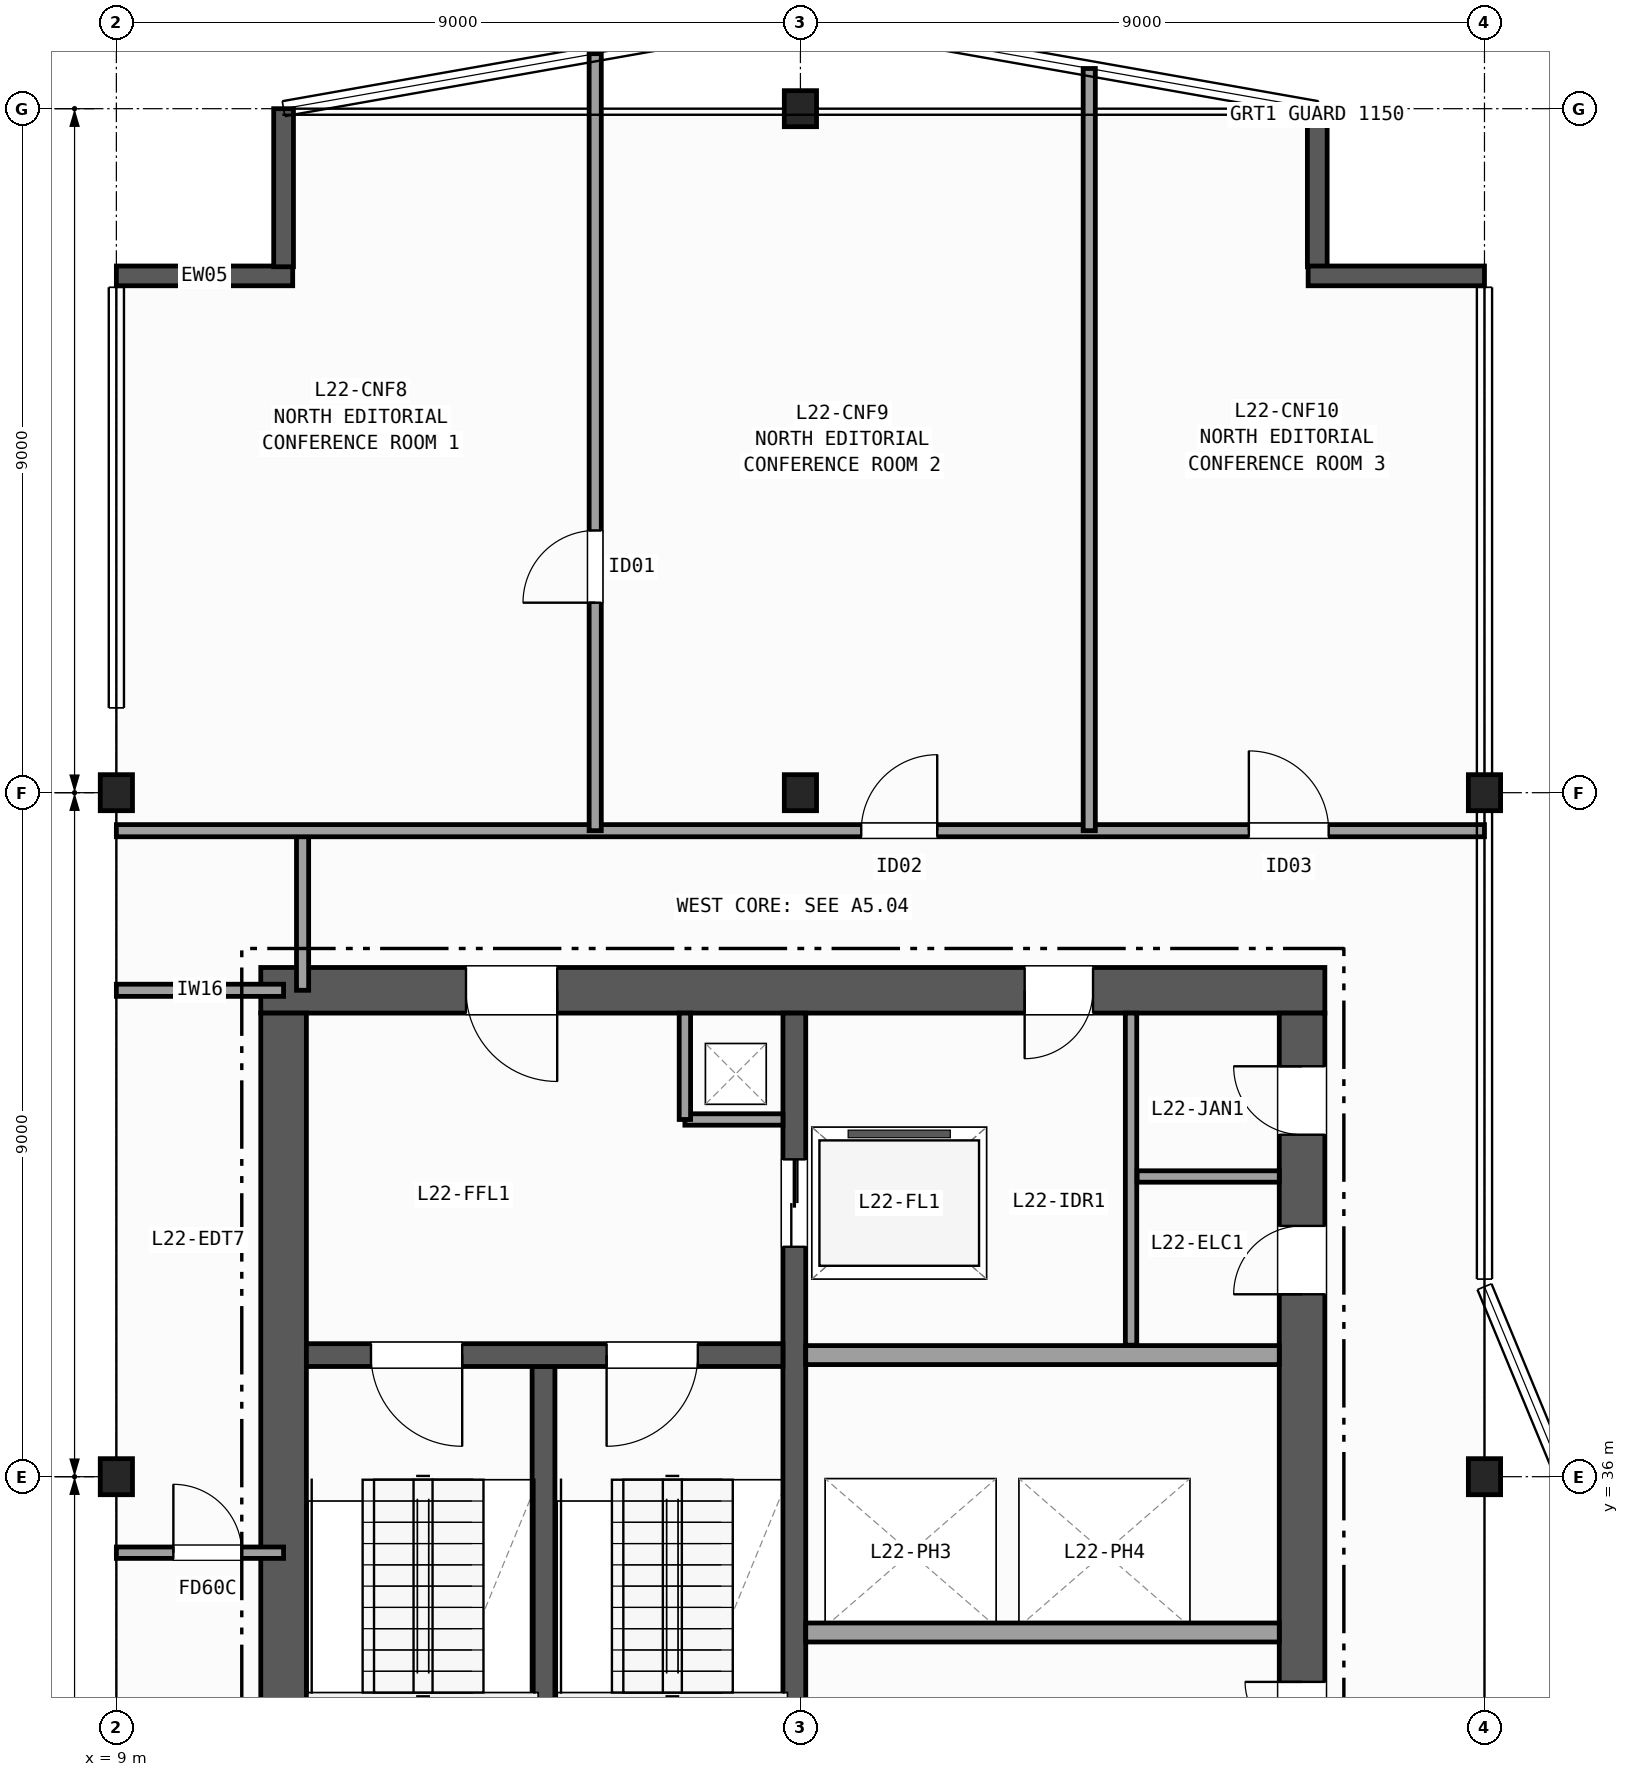
"""IFC4 building model, lengths in metres.
Left out: names, types, materials, properties, quantities, classifications, styles, units other than length and angle.
Written with IfcOpenShell. Run it as: python <this file> out.ifc"""

import sys

from ifc_helpers import new_model, si_unit, direction, frame, frame_2d, origin, origin_2d, place, context, subcontext, project, spatial, rectangle, i_section, extrude, element, fill, save


model = new_model("IFC4")
c1 = context("Model", 3, precision=1e-05, world=origin(), true_north=direction((0.0, 1.0)))
c2 = subcontext(c1, "Body", "Model", "MODEL_VIEW")
j1 = project(units=[si_unit("LENGTHUNIT", "METRE"), si_unit("PLANEANGLEUNIT", "RADIAN")], contexts=[c1])
p1 = place(None, origin())
s1 = spatial("IfcSite", under=j1, at=p1, CompositionType="ELEMENT")
p2 = place(p1, origin())
s2 = spatial("IfcBuilding", under=s1, at=p2, CompositionType="ELEMENT")
p3 = place(p2, frame((0.0, 0.0, 92.8)))
s3 = spatial("IfcBuildingStorey", under=s2, at=p3, CompositionType="ELEMENT", Elevation=92.8)
for number, where, z_axis, x_axis in (
    (1, (9.0, 36.0, 0.0), (0.0, 0.0, 1.0), (1.0, 0.0, 0.0)),
    (2, (9.0, 45.0, 0.0), (0.0, 0.0, 1.0), (1.0, 0.0, 0.0)),
    (3, (18.0, 45.0, 0.0), (0.0, 0.0, 1.0), (1.0, 0.0, 0.0)),
    (4, (18.0, 54.0, 0.0), (0.0, 0.0, 1.0), (1.0, 0.0, 0.0)),
    (5, (27.0, 36.0, 0.0), (0.0, 0.0, 1.0), (1.0, 0.0, 0.0)),
    (6, (27.0, 45.0, 0.0), (0.0, 0.0, 1.0), (1.0, 0.0, 0.0)),
):
    element("IfcColumn", number, at=place(p3, frame(where, z_axis=z_axis, x_axis=x_axis)), inside=s3, PredefinedType="COLUMN", context=c2, shape_type="SweptSolid", body=[
        extrude(i_section(OverallWidth=0.424, OverallDepth=0.474, WebThickness=0.048, FlangeThickness=0.077, FilletRadius=0.015, at=origin_2d()), origin(), (0.0, 0.0, 1.0), 3.7),
    ])
p4 = place(p3, frame((9.0, 51.8, 0.0), z_axis=(0.0, 0.0, 1.0), x_axis=(1.0, 0.0, 0.0)))
e7 = element("IfcWall", 7, at=p4, inside=s3, PredefinedType="SOLIDWALL", context=c2, shape_type="SweptSolid", body=[
    extrude(rectangle(XDim=2.32, YDim=0.26, at=frame_2d((1.16, 0.0))), origin(), (0.0, 0.0, 1.0), 3.42),
])
for number, where, z_axis, x_axis in (
    (8, (11.2, 51.92, 0.0), (0.0, 0.0, 1.0), (0.0, 1.0, 0.0)),
    (9, (24.8, 54.0, 0.0), (0.0, 0.0, 1.0), (0.0, -1.0, 0.0)),
):
    element("IfcWall", number, at=place(p3, frame(where, z_axis=z_axis, x_axis=x_axis)), inside=s3, PredefinedType="SOLIDWALL", context=c2, shape_type="SweptSolid", body=[
        extrude(rectangle(XDim=2.08, YDim=0.26, at=frame_2d((1.04, 0.0))), origin(), (0.0, 0.0, 1.0), 3.42),
    ])
p5 = place(p3, frame((24.68, 51.8, 0.0), z_axis=(0.0, 0.0, 1.0), x_axis=(1.0, 0.0, 0.0)))
e10 = element("IfcWall", 10, at=p5, inside=s3, PredefinedType="SOLIDWALL", context=c2, shape_type="SweptSolid", body=[
    extrude(rectangle(XDim=2.32, YDim=0.26, at=frame_2d((1.16, 0.0))), origin(), (0.0, 0.0, 1.0), 3.42),
])
p6 = place(p3, frame((24.9, 42.4, 0.0), z_axis=(0.0, 0.0, 1.0), x_axis=(-1.0, 0.0, 0.0)))
e11 = element("IfcWall", 11, at=p6, inside=s3, PredefinedType="SHEAR", context=c2, shape_type="SweptSolid", body=[
    extrude(rectangle(XDim=14.0, YDim=0.6, at=frame_2d((7.0, 0.0))), origin(), (0.0, 0.0, 1.0), 3.42),
])
p7 = place(p6, frame((10.1, 0.0, 0.0)))
e12 = element("IfcOpeningElement", 12, at=p7, cuts=e11, PredefinedType="OPENING", context=c2, shape_type="SweptSolid", body=[
    extrude(rectangle(XDim=1.2, YDim=2.15, at=frame_2d((0.6, 1.075))), frame((0.0, 0.31, 0.0), z_axis=(0.0, -1.0, 0.0), x_axis=(1.0, 0.0, 0.0)), (0.0, 0.0, 1.0), 0.62),
])
p8 = place(p6, frame((3.05, 0.0, 0.0)))
e13 = element("IfcOpeningElement", 13, at=p8, cuts=e11, PredefinedType="OPENING", context=c2, shape_type="SweptSolid", body=[
    extrude(rectangle(XDim=0.9, YDim=2.1, at=frame_2d((0.45, 1.05))), frame((0.0, 0.31, 0.0), z_axis=(0.0, -1.0, 0.0), x_axis=(1.0, 0.0, 0.0)), (0.0, 0.0, 1.0), 0.62),
])
p9 = place(p3, frame((11.2, 42.1, 0.0), z_axis=(0.0, 0.0, 1.0), x_axis=(0.0, -1.0, 0.0)))
e14 = element("IfcWall", 14, at=p9, inside=s3, PredefinedType="SHEAR", context=c2, shape_type="SweptSolid", body=[
    extrude(rectangle(XDim=13.6, YDim=0.6, at=frame_2d((6.8, 0.0))), origin(), (0.0, 0.0, 1.0), 3.42),
])
p10 = place(p3, frame((24.6, 28.5, 0.0), z_axis=(0.0, 0.0, 1.0), x_axis=(0.0, 1.0, 0.0)))
e15 = element("IfcWall", 15, at=p10, inside=s3, PredefinedType="SHEAR", context=c2, shape_type="SweptSolid", body=[
    extrude(rectangle(XDim=13.6, YDim=0.6, at=frame_2d((6.8, 0.0))), origin(), (0.0, 0.0, 1.0), 3.42),
])
p11 = place(p10, frame((3.3, 0.0, 0.0)))
e16 = element("IfcOpeningElement", 16, at=p11, cuts=e15, PredefinedType="OPENING", context=c2, shape_type="SweptSolid", body=[
    extrude(rectangle(XDim=1.5, YDim=2.2, at=frame_2d((0.75, 1.1))), frame((0.0, 0.31, 0.0), z_axis=(0.0, -1.0, 0.0), x_axis=(1.0, 0.0, 0.0)), (0.0, 0.0, 1.0), 0.62),
])
p12 = place(p10, frame((9.9, 0.0, 0.0)))
e17 = element("IfcOpeningElement", 17, at=p12, cuts=e15, PredefinedType="OPENING", context=c2, shape_type="SweptSolid", body=[
    extrude(rectangle(XDim=0.9, YDim=2.1, at=frame_2d((0.45, 1.05))), frame((0.0, 0.31, 0.0), z_axis=(0.0, -1.0, 0.0), x_axis=(1.0, 0.0, 0.0)), (0.0, 0.0, 1.0), 0.62),
])
p13 = place(p10, frame((12.0, 0.0, 0.0)))
e18 = element("IfcOpeningElement", 18, at=p13, cuts=e15, PredefinedType="OPENING", context=c2, shape_type="SweptSolid", body=[
    extrude(rectangle(XDim=0.9, YDim=2.1, at=frame_2d((0.45, 1.05))), frame((0.0, 0.31, 0.0), z_axis=(0.0, -1.0, 0.0), x_axis=(1.0, 0.0, 0.0)), (0.0, 0.0, 1.0), 0.62),
])
p14 = place(p3, frame((14.62, 28.5, 0.0), z_axis=(0.0, 0.0, 1.0), x_axis=(0.0, 1.0, 0.0)))
e19 = element("IfcWall", 19, at=p14, inside=s3, PredefinedType="SHEAR", context=c2, shape_type="SweptSolid", body=[
    extrude(rectangle(XDim=8.95, YDim=0.3, at=frame_2d((4.475, 0.0))), origin(), (0.0, 0.0, 1.0), 3.42),
])
p15 = place(p3, frame((17.92, 42.1, 0.0), z_axis=(0.0, 0.0, 1.0), x_axis=(0.0, -1.0, 0.0)))
e20 = element("IfcWall", 20, at=p15, inside=s3, PredefinedType="SHEAR", context=c2, shape_type="SweptSolid", body=[
    extrude(rectangle(XDim=13.6, YDim=0.3, at=frame_2d((6.8, 0.0))), origin(), (0.0, 0.0, 1.0), 3.42),
])
p16 = place(p15, frame((1.925, 0.0, 0.0)))
e21 = element("IfcOpeningElement", 21, at=p16, cuts=e20, PredefinedType="OPENING", context=c2, shape_type="SweptSolid", body=[
    extrude(rectangle(XDim=1.15, YDim=2.15, at=frame_2d((0.575, 1.075))), frame((0.0, 0.16, 0.0), z_axis=(0.0, -1.0, 0.0), x_axis=(1.0, 0.0, 0.0)), (0.0, 0.0, 1.0), 0.32),
])
p17 = place(p3, frame((17.77, 37.6, 0.0), z_axis=(0.0, 0.0, 1.0), x_axis=(-1.0, 0.0, 0.0)))
e22 = element("IfcWall", 22, at=p17, inside=s3, PredefinedType="SHEAR", context=c2, shape_type="SweptSolid", body=[
    extrude(rectangle(XDim=6.27, YDim=0.3, at=frame_2d((3.135, 0.0))), origin(), (0.0, 0.0, 1.0), 3.42),
])
p18 = place(p17, frame((4.22, 0.0, 0.0)))
e23 = element("IfcOpeningElement", 23, at=p18, cuts=e22, PredefinedType="OPENING", context=c2, shape_type="SweptSolid", body=[
    extrude(rectangle(XDim=1.2, YDim=2.15, at=frame_2d((0.6, 1.075))), frame((0.0, 0.16, 0.0), z_axis=(0.0, -1.0, 0.0), x_axis=(1.0, 0.0, 0.0)), (0.0, 0.0, 1.0), 0.32),
])
p19 = place(p17, frame((1.12, 0.0, 0.0)))
e24 = element("IfcOpeningElement", 24, at=p19, cuts=e22, PredefinedType="OPENING", context=c2, shape_type="SweptSolid", body=[
    extrude(rectangle(XDim=1.2, YDim=2.15, at=frame_2d((0.6, 1.075))), frame((0.0, 0.16, 0.0), z_axis=(0.0, -1.0, 0.0), x_axis=(1.0, 0.0, 0.0)), (0.0, 0.0, 1.0), 0.32),
])
p20 = place(p3, frame((16.48, 40.7, 0.0), z_axis=(0.0, 0.0, 1.0), x_axis=(1.0, 0.0, 0.0)))
e25 = element("IfcWall", 25, at=p20, inside=s3, PredefinedType="PARTITIONING", context=c2, shape_type="SweptSolid", body=[
    extrude(rectangle(XDim=1.29, YDim=0.15, at=frame_2d((0.645, 0.0))), origin(), (0.0, 0.0, 1.0), 3.42),
])
p21 = place(p3, frame((16.48, 40.7, 0.0), z_axis=(0.0, 0.0, 1.0), x_axis=(0.0, 1.0, 0.0)))
e26 = element("IfcWall", 26, at=p21, inside=s3, PredefinedType="PARTITIONING", context=c2, shape_type="SweptSolid", body=[
    extrude(rectangle(XDim=1.4, YDim=0.15, at=frame_2d((0.7, 0.0))), origin(), (0.0, 0.0, 1.0), 3.42),
])
for number, where, z_axis, x_axis in (
    (27, (18.07, 37.6, 0.0), (0.0, 0.0, 1.0), (1.0, 0.0, 0.0)),
    (28, (24.3, 33.95, 0.0), (0.0, 0.0, 1.0), (-1.0, 0.0, 0.0)),
):
    element("IfcWall", number, at=place(p3, frame(where, z_axis=z_axis, x_axis=x_axis)), inside=s3, PredefinedType="PARTITIONING", context=c2, shape_type="SweptSolid", body=[
        extrude(rectangle(XDim=6.23, YDim=0.25, at=frame_2d((3.115, 0.0))), origin(), (0.0, 0.0, 1.0), 3.42),
    ])
p22 = place(p3, frame((22.35, 37.73, 0.0), z_axis=(0.0, 0.0, 1.0), x_axis=(0.0, 1.0, 0.0)))
e29 = element("IfcWall", 29, at=p22, inside=s3, PredefinedType="PARTITIONING", context=c2, shape_type="SweptSolid", body=[
    extrude(rectangle(XDim=4.37, YDim=0.15, at=frame_2d((2.185, 0.0))), origin(), (0.0, 0.0, 1.0), 3.42),
])
p23 = place(p3, frame((22.43, 39.95, 0.0), z_axis=(0.0, 0.0, 1.0), x_axis=(1.0, 0.0, 0.0)))
e30 = element("IfcWall", 30, at=p23, inside=s3, PredefinedType="PARTITIONING", context=c2, shape_type="SweptSolid", body=[
    extrude(rectangle(XDim=1.87, YDim=0.15, at=frame_2d((0.935, 0.0))), origin(), (0.0, 0.0, 1.0), 3.42),
])
p24 = place(p3, frame((9.0, 42.4, 0.0), z_axis=(0.0, 0.0, 1.0), x_axis=(1.0, 0.0, 0.0)))
e31 = element("IfcWall", 31, at=p24, inside=s3, PredefinedType="PARTITIONING", context=c2, shape_type="SweptSolid", body=[
    extrude(rectangle(XDim=2.2, YDim=0.16, at=frame_2d((1.1, 0.0))), origin(), (0.0, 0.0, 1.0), 2.627),
])
p25 = place(p3, frame((11.45, 42.4, 0.0), z_axis=(0.0, 0.0, 1.0), x_axis=(0.0, 1.0, 0.0)))
e32 = element("IfcWall", 32, at=p25, inside=s3, PredefinedType="PARTITIONING", context=c2, shape_type="SweptSolid", body=[
    extrude(rectangle(XDim=2.1, YDim=0.16, at=frame_2d((1.05, 0.0))), origin(), (0.0, 0.0, 1.0), 3.42),
])
p26 = place(p3, frame((9.0, 35.0, 0.0), z_axis=(0.0, 0.0, 1.0), x_axis=(1.0, 0.0, 0.0)))
e33 = element("IfcWall", 33, at=p26, inside=s3, PredefinedType="PARTITIONING", context=c2, shape_type="SweptSolid", body=[
    extrude(rectangle(XDim=2.2, YDim=0.15, at=frame_2d((1.1, 0.0))), origin(), (0.0, 0.0, 1.0), 2.627),
])
p27 = place(p26, frame((0.75, 0.0, 0.0)))
e34 = element("IfcOpeningElement", 34, at=p27, cuts=e33, PredefinedType="OPENING", context=c2, shape_type="SweptSolid", body=[
    extrude(rectangle(XDim=0.9, YDim=2.1, at=frame_2d((0.45, 1.05))), frame((0.0, 0.085, 0.0), z_axis=(0.0, -1.0, 0.0), x_axis=(1.0, 0.0, 0.0)), (0.0, 0.0, 1.0), 0.17),
])
p28 = place(p3, frame((9.0, 44.5, 0.0), z_axis=(0.0, 0.0, 1.0), x_axis=(1.0, 0.0, 0.0)))
e35 = element("IfcWall", 35, at=p28, inside=s3, PredefinedType="PARTITIONING", context=c2, shape_type="SweptSolid", body=[
    extrude(rectangle(XDim=18.0, YDim=0.16, at=frame_2d((9.0, 0.0))), origin(), (0.0, 0.0, 1.0), 2.627),
])
p29 = place(p28, frame((9.8, 0.0, 0.0)))
e36 = element("IfcOpeningElement", 36, at=p29, cuts=e35, PredefinedType="OPENING", context=c2, shape_type="SweptSolid", body=[
    extrude(rectangle(XDim=1.0, YDim=2.1, at=frame_2d((0.5, 1.05))), frame((0.0, 0.09, 0.0), z_axis=(0.0, -1.0, 0.0), x_axis=(1.0, 0.0, 0.0)), (0.0, 0.0, 1.0), 0.18),
])
p30 = place(p28, frame((14.9, 0.0, 0.0)))
e37 = element("IfcOpeningElement", 37, at=p30, cuts=e35, PredefinedType="OPENING", context=c2, shape_type="SweptSolid", body=[
    extrude(rectangle(XDim=1.05, YDim=2.15, at=frame_2d((0.525, 1.075))), frame((0.0, 0.09, 0.0), z_axis=(0.0, -1.0, 0.0), x_axis=(1.0, 0.0, 0.0)), (0.0, 0.0, 1.0), 0.18),
])
p31 = place(p3, frame((15.3, 44.5, 0.0), z_axis=(0.0, 0.0, 1.0), x_axis=(0.0, 1.0, 0.0)))
e38 = element("IfcWall", 38, at=p31, inside=s3, PredefinedType="PARTITIONING", context=c2, shape_type="SweptSolid", body=[
    extrude(rectangle(XDim=10.224, YDim=0.16, at=frame_2d((5.112, 0.0))), origin(), (0.0, 0.0, 1.0), 3.42),
])
p32 = place(p31, frame((3.0, 0.0, 0.0)))
e39 = element("IfcOpeningElement", 39, at=p32, cuts=e38, PredefinedType="OPENING", context=c2, shape_type="SweptSolid", body=[
    extrude(rectangle(XDim=0.95, YDim=2.1, at=frame_2d((0.475, 1.05))), frame((0.0, 0.09, 0.0), z_axis=(0.0, -1.0, 0.0), x_axis=(1.0, 0.0, 0.0)), (0.0, 0.0, 1.0), 0.18),
])
p33 = place(p3, frame((21.8, 44.5, 0.0), z_axis=(0.0, 0.0, 1.0), x_axis=(0.0, 1.0, 0.0)))
e40 = element("IfcWall", 40, at=p33, inside=s3, PredefinedType="PARTITIONING", context=c2, shape_type="SweptSolid", body=[
    extrude(rectangle(XDim=10.029, YDim=0.16, at=frame_2d((5.015, 0.0))), origin(), (0.0, 0.0, 1.0), 3.42),
])
p34 = place(p18, origin())
e41 = element("IfcDoor", 41, at=p34, inside=s3, OperationType="SINGLE_SWING_LEFT", PredefinedType="DOOR", context=c2, shape_type="SweptSolid", body=[
    extrude(rectangle(XDim=1.2, YDim=2.15, at=frame_2d((0.6, 1.075))), frame((0.0, 0.025, 0.0), z_axis=(0.0, -1.0, 0.0), x_axis=(1.0, 0.0, 0.0)), (0.0, 0.0, 1.0), 0.05),
])
fill(e23, e41)
p35 = place(p19, origin())
e42 = element("IfcDoor", 42, at=p35, inside=s3, OperationType="SINGLE_SWING_RIGHT", PredefinedType="DOOR", context=c2, shape_type="SweptSolid", body=[
    extrude(rectangle(XDim=1.2, YDim=2.15, at=frame_2d((0.6, 1.075))), frame((0.0, 0.025, 0.0), z_axis=(0.0, -1.0, 0.0), x_axis=(1.0, 0.0, 0.0)), (0.0, 0.0, 1.0), 0.05),
])
fill(e24, e42)
p36 = place(p11, origin())
e43 = element("IfcDoor", 43, at=p36, inside=s3, OperationType="DOUBLE_DOOR_SINGLE_SWING", PredefinedType="DOOR", context=c2, shape_type="SweptSolid", body=[
    extrude(rectangle(XDim=1.5, YDim=2.2, at=frame_2d((0.75, 1.1))), frame((0.0, 0.025, 0.0), z_axis=(0.0, -1.0, 0.0), x_axis=(1.0, 0.0, 0.0)), (0.0, 0.0, 1.0), 0.05),
])
fill(e16, e43)
p37 = place(p7, origin())
e44 = element("IfcDoor", 44, at=p37, inside=s3, OperationType="SINGLE_SWING_LEFT", PredefinedType="DOOR", context=c2, shape_type="SweptSolid", body=[
    extrude(rectangle(XDim=1.2, YDim=2.15, at=frame_2d((0.6, 1.075))), frame((0.0, 0.025, 0.0), z_axis=(0.0, -1.0, 0.0), x_axis=(1.0, 0.0, 0.0)), (0.0, 0.0, 1.0), 0.05),
])
fill(e12, e44)
p38 = place(p12, origin())
e45 = element("IfcDoor", 45, at=p38, inside=s3, OperationType="SINGLE_SWING_LEFT", PredefinedType="DOOR", context=c2, shape_type="SweptSolid", body=[
    extrude(rectangle(XDim=0.9, YDim=2.1, at=frame_2d((0.45, 1.05))), frame((0.0, 0.025, 0.0), z_axis=(0.0, -1.0, 0.0), x_axis=(1.0, 0.0, 0.0)), (0.0, 0.0, 1.0), 0.05),
])
fill(e17, e45)
p39 = place(p8, origin())
e46 = element("IfcDoor", 46, at=p39, inside=s3, OperationType="SINGLE_SWING_RIGHT", PredefinedType="DOOR", context=c2, shape_type="SweptSolid", body=[
    extrude(rectangle(XDim=0.9, YDim=2.1, at=frame_2d((0.45, 1.05))), frame((0.0, 0.025, 0.0), z_axis=(0.0, -1.0, 0.0), x_axis=(1.0, 0.0, 0.0)), (0.0, 0.0, 1.0), 0.05),
])
fill(e13, e46)
p40 = place(p13, origin())
e47 = element("IfcDoor", 47, at=p40, inside=s3, OperationType="SINGLE_SWING_RIGHT", PredefinedType="DOOR", context=c2, shape_type="SweptSolid", body=[
    extrude(rectangle(XDim=0.9, YDim=2.1, at=frame_2d((0.45, 1.05))), frame((0.0, 0.025, 0.0), z_axis=(0.0, -1.0, 0.0), x_axis=(1.0, 0.0, 0.0)), (0.0, 0.0, 1.0), 0.05),
])
fill(e18, e47)
p41 = place(p16, origin())
e48 = element("IfcDoor", 48, at=p41, inside=s3, OperationType="DOUBLE_DOOR_SLIDING", PredefinedType="DOOR", context=c2, shape_type="SweptSolid", body=[
    extrude(rectangle(XDim=1.15, YDim=2.15, at=frame_2d((0.575, 1.075))), frame((0.0, 0.025, 0.0), z_axis=(0.0, -1.0, 0.0), x_axis=(1.0, 0.0, 0.0)), (0.0, 0.0, 1.0), 0.05),
])
fill(e21, e48)
p42 = place(p27, origin())
e49 = element("IfcDoor", 49, at=p42, inside=s3, OperationType="SINGLE_SWING_LEFT", PredefinedType="DOOR", context=c2, shape_type="SweptSolid", body=[
    extrude(rectangle(XDim=0.9, YDim=2.1, at=frame_2d((0.45, 1.05))), frame((0.0, 0.025, 0.0), z_axis=(0.0, -1.0, 0.0), x_axis=(1.0, 0.0, 0.0)), (0.0, 0.0, 1.0), 0.05),
])
fill(e34, e49)
p43 = place(p32, origin())
e50 = element("IfcDoor", 50, at=p43, inside=s3, OperationType="SINGLE_SWING_LEFT", PredefinedType="DOOR", context=c2, shape_type="SweptSolid", body=[
    extrude(rectangle(XDim=0.95, YDim=2.1, at=frame_2d((0.475, 1.05))), frame((0.0, 0.025, 0.0), z_axis=(0.0, -1.0, 0.0), x_axis=(1.0, 0.0, 0.0)), (0.0, 0.0, 1.0), 0.05),
])
fill(e39, e50)
p44 = place(p29, origin())
e51 = element("IfcDoor", 51, at=p44, inside=s3, OperationType="SINGLE_SWING_RIGHT", PredefinedType="DOOR", context=c2, shape_type="SweptSolid", body=[
    extrude(rectangle(XDim=1.0, YDim=2.1, at=frame_2d((0.5, 1.05))), frame((0.0, 0.025, 0.0), z_axis=(0.0, -1.0, 0.0), x_axis=(1.0, 0.0, 0.0)), (0.0, 0.0, 1.0), 0.05),
])
fill(e36, e51)
p45 = place(p30, origin())
e52 = element("IfcDoor", 52, at=p45, inside=s3, OperationType="SINGLE_SWING_LEFT", PredefinedType="DOOR", context=c2, shape_type="SweptSolid", body=[
    extrude(rectangle(XDim=1.05, YDim=2.15, at=frame_2d((0.525, 1.075))), frame((0.0, 0.025, 0.0), z_axis=(0.0, -1.0, 0.0), x_axis=(1.0, 0.0, 0.0)), (0.0, 0.0, 1.0), 0.05),
])
fill(e37, e52)
save(model, sys.argv[1])
